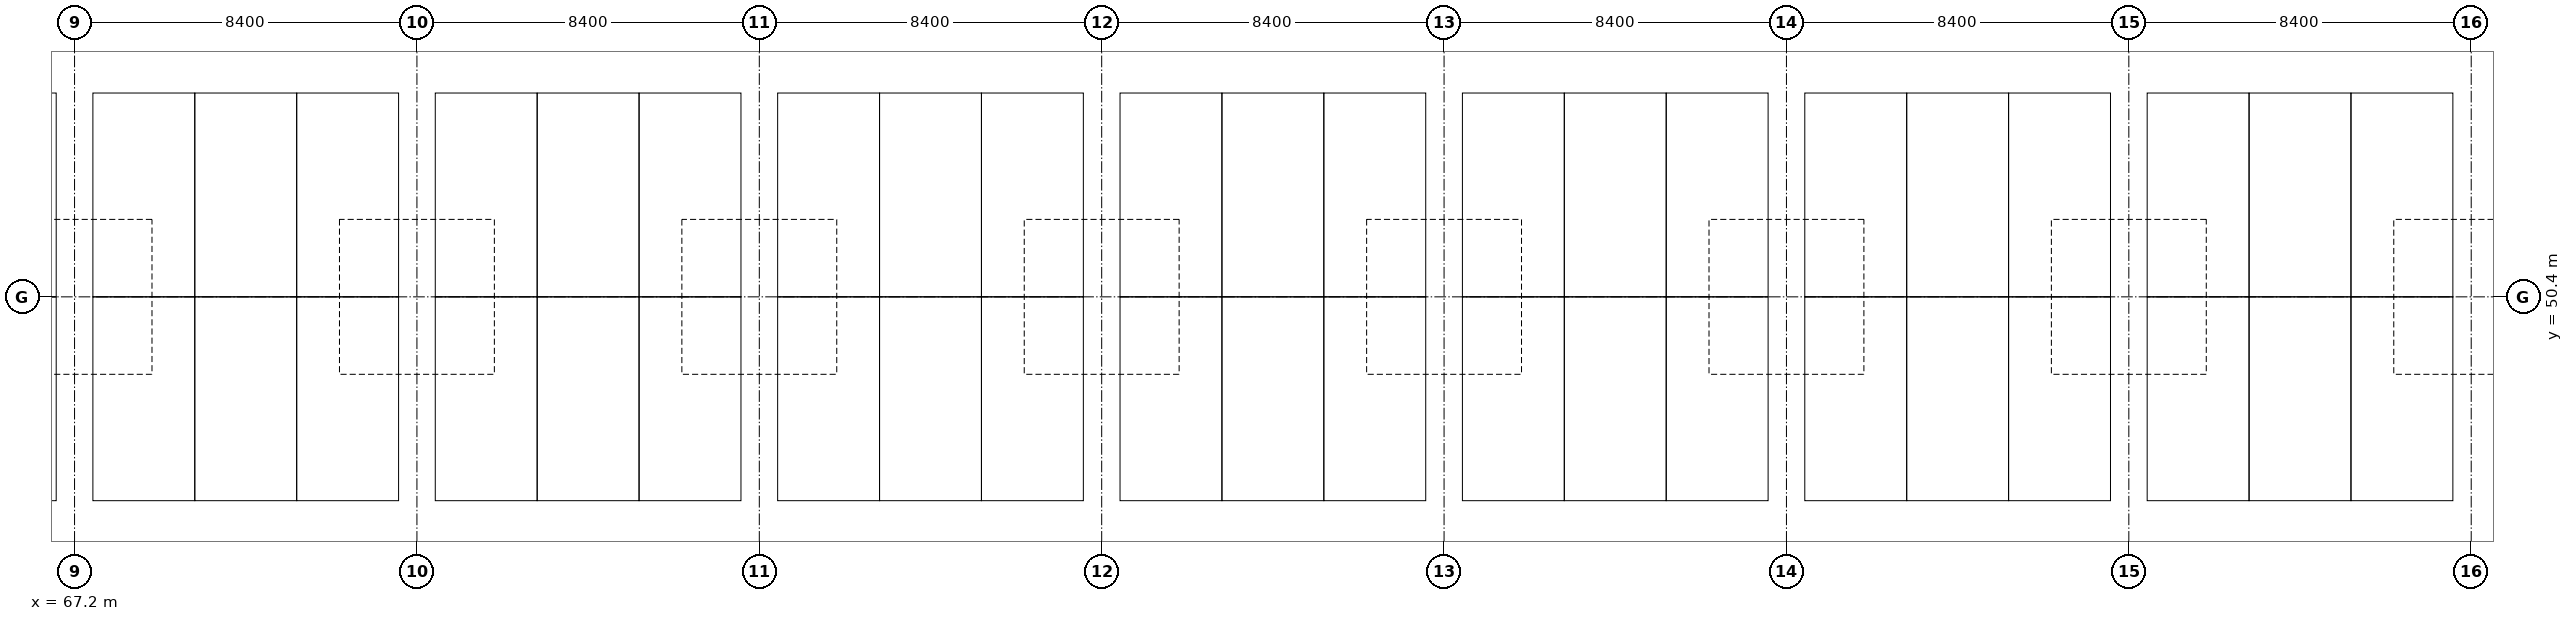
"""IFC4 building model, lengths in metres.
Left out: names, types, materials, properties, quantities, classifications, styles, units other than length and angle.
Written with IfcOpenShell. Run it as: python <this file> out.ifc"""

import sys

from ifc_helpers import new_model, si_unit, direction, frame, origin, origin_2d, place, context, subcontext, project, spatial, rectangle, extrude, element, save


model = new_model("IFC4")
c1 = context("Model", 3, precision=1e-05, world=origin(), true_north=direction((0.0, 1.0)))
c2 = subcontext(c1, "Body", "Model", "MODEL_VIEW")
j1 = project(units=[si_unit("LENGTHUNIT", "METRE"), si_unit("PLANEANGLEUNIT", "RADIAN")], contexts=[c1])
p1 = place(None, origin())
s1 = spatial("IfcSite", under=j1, at=p1, CompositionType="ELEMENT")
p2 = place(p1, origin())
s2 = spatial("IfcBuilding", under=s1, at=p2, CompositionType="ELEMENT")
p3 = place(p2, frame((0.0, 0.0, -3.0)))
s3 = spatial("IfcBuildingStorey", under=s2, at=p3, CompositionType="ELEMENT", Elevation=-3.0)
p4 = place(p3, frame((67.2, 50.4, 0.0), z_axis=(0.0, 0.0, 1.0), x_axis=(1.0, 0.0, 0.0)))
e1 = element("IfcColumn", 1, at=p4, inside=s3, PredefinedType="COLUMN", context=c2, shape_type="SweptSolid", body=[
    extrude(rectangle(XDim=0.8, YDim=0.8, at=origin_2d()), origin(), (0.0, 0.0, 1.0), 2.5),
])
p5 = place(p3, frame((75.6, 50.4, 0.0), z_axis=(0.0, 0.0, 1.0), x_axis=(1.0, 0.0, 0.0)))
e2 = element("IfcColumn", 2, at=p5, inside=s3, PredefinedType="COLUMN", context=c2, shape_type="SweptSolid", body=[
    extrude(rectangle(XDim=0.8, YDim=0.8, at=origin_2d()), origin(), (0.0, 0.0, 1.0), 3.0),
])
p6 = place(p3, frame((84.0, 50.4, 0.0), z_axis=(0.0, 0.0, 1.0), x_axis=(1.0, 0.0, 0.0)))
e3 = element("IfcColumn", 3, at=p6, inside=s3, PredefinedType="COLUMN", context=c2, shape_type="SweptSolid", body=[
    extrude(rectangle(XDim=0.8, YDim=0.8, at=origin_2d()), origin(), (0.0, 0.0, 1.0), 2.5),
])
p7 = place(p3, frame((92.4, 50.4, 0.0), z_axis=(0.0, 0.0, 1.0), x_axis=(1.0, 0.0, 0.0)))
e4 = element("IfcColumn", 4, at=p7, inside=s3, PredefinedType="COLUMN", context=c2, shape_type="SweptSolid", body=[
    extrude(rectangle(XDim=0.8, YDim=0.8, at=origin_2d()), origin(), (0.0, 0.0, 1.0), 3.0),
])
p8 = place(p3, frame((100.8, 50.4, 0.0), z_axis=(0.0, 0.0, 1.0), x_axis=(1.0, 0.0, 0.0)))
e5 = element("IfcColumn", 5, at=p8, inside=s3, PredefinedType="COLUMN", context=c2, shape_type="SweptSolid", body=[
    extrude(rectangle(XDim=0.8, YDim=0.8, at=origin_2d()), origin(), (0.0, 0.0, 1.0), 2.5),
])
p9 = place(p3, frame((109.2, 50.4, 0.0), z_axis=(0.0, 0.0, 1.0), x_axis=(1.0, 0.0, 0.0)))
e6 = element("IfcColumn", 6, at=p9, inside=s3, PredefinedType="COLUMN", context=c2, shape_type="SweptSolid", body=[
    extrude(rectangle(XDim=0.8, YDim=0.8, at=origin_2d()), origin(), (0.0, 0.0, 1.0), 3.0),
])
p10 = place(p3, frame((117.6, 50.4, 0.0), z_axis=(0.0, 0.0, 1.0), x_axis=(1.0, 0.0, 0.0)))
e7 = element("IfcColumn", 7, at=p10, inside=s3, PredefinedType="COLUMN", context=c2, shape_type="SweptSolid", body=[
    extrude(rectangle(XDim=0.8, YDim=0.8, at=origin_2d()), origin(), (0.0, 0.0, 1.0), 2.5),
])
p11 = place(p3, frame((126.0, 50.4, 0.0), z_axis=(0.0, 0.0, 1.0), x_axis=(1.0, 0.0, 0.0)))
e8 = element("IfcColumn", 8, at=p11, inside=s3, PredefinedType="COLUMN", context=c2, shape_type="SweptSolid", body=[
    extrude(rectangle(XDim=0.8, YDim=0.8, at=origin_2d()), origin(), (0.0, 0.0, 1.0), 3.0),
])
save(model, sys.argv[1])
